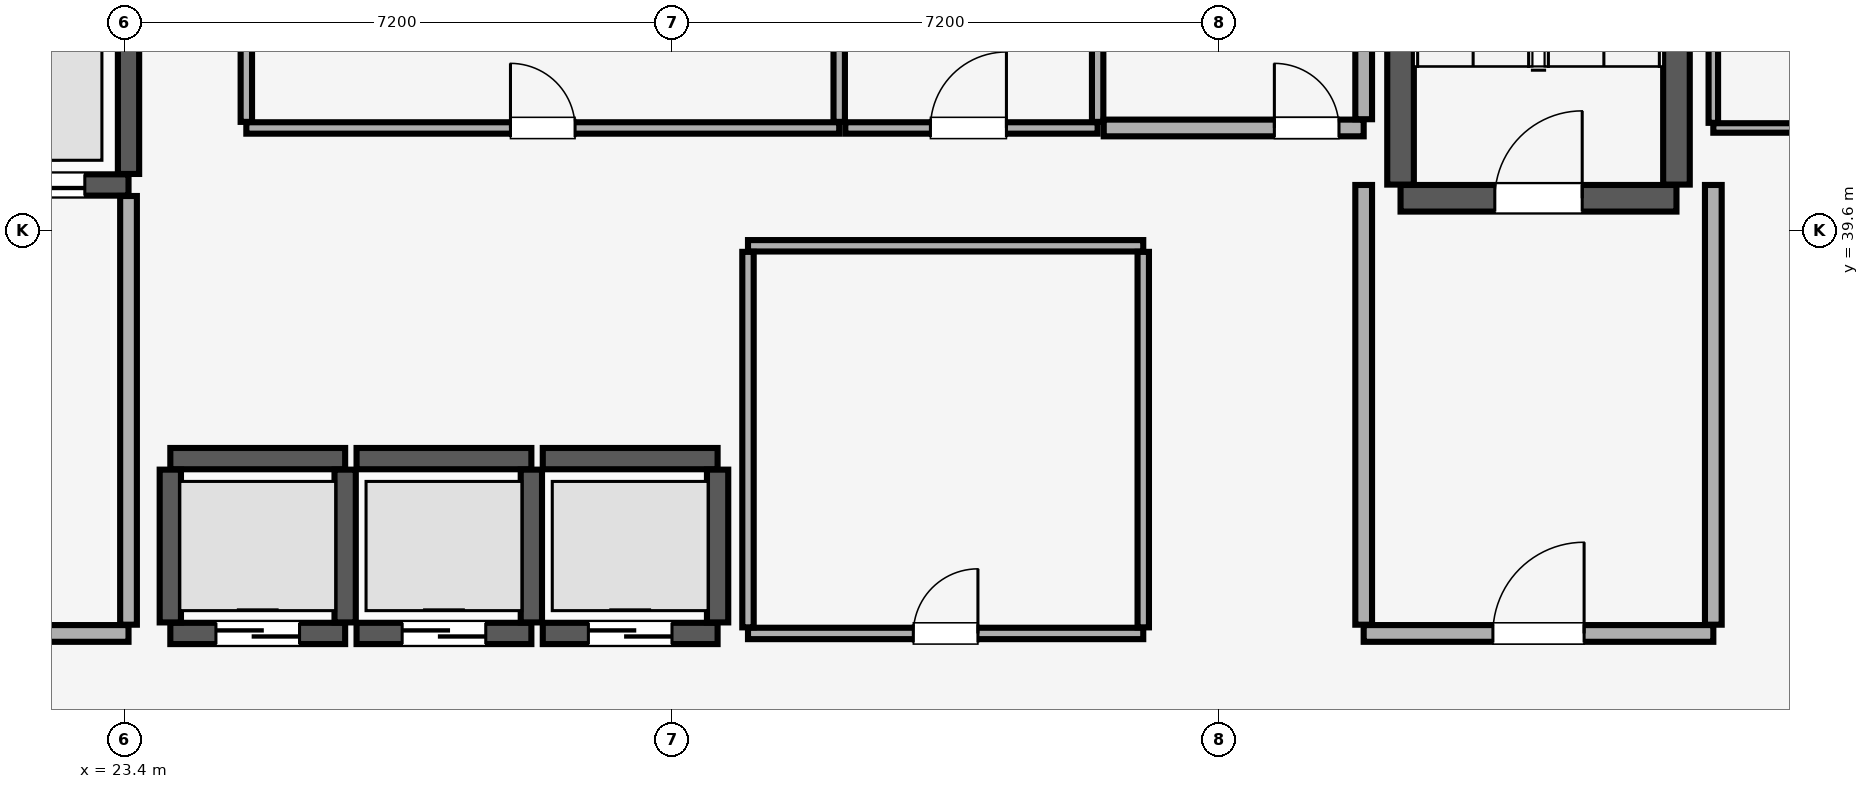
"""IFC4 building model, lengths in metres.
Left out: names, types, materials, properties, quantities, classifications, styles, units other than length and angle.
Written with IfcOpenShell. Run it as: python <this file> out.ifc"""

import sys

from ifc_helpers import new_model, si_unit, direction, frame, frame_2d, origin, place, context, subcontext, project, spatial, rectangle, extrude, element, fill, save


model = new_model("IFC4")
c1 = context("Model", 3, precision=1e-05, world=origin(), true_north=direction((0.0, 1.0)))
c2 = subcontext(c1, "Body", "Model", "MODEL_VIEW")
j1 = project(units=[si_unit("LENGTHUNIT", "METRE"), si_unit("PLANEANGLEUNIT", "RADIAN")], contexts=[c1])
p1 = place(None, origin())
s1 = spatial("IfcSite", under=j1, at=p1, CompositionType="ELEMENT")
p2 = place(p1, origin())
s2 = spatial("IfcBuilding", under=s1, at=p2, CompositionType="ELEMENT")
p3 = place(p2, frame((0.0, 0.0, 76.4)))
s3 = spatial("IfcBuildingStorey", under=s2, at=p3, CompositionType="ELEMENT", Elevation=76.4)
p4 = place(p3, frame((40.185, 40.025, 0.0), z_axis=(0.0, 0.0, 1.0), x_axis=(1.0, 0.0, 0.0)))
e1 = element("IfcWall", 1, at=p4, inside=s3, PredefinedType="SHEAR", context=c2, shape_type="SweptSolid", body=[
    extrude(rectangle(XDim=3.63, YDim=0.35, at=frame_2d((1.815, 0.0))), origin(), (0.0, 0.0, 1.0), 3.4),
])
p5 = place(p4, frame((1.24, 0.0, 0.0)))
e2 = element("IfcOpeningElement", 2, at=p5, cuts=e1, PredefinedType="OPENING", context=c2, shape_type="SweptSolid", body=[
    extrude(rectangle(XDim=1.15, YDim=2.15, at=frame_2d((0.575, 1.075))), frame((0.0, 0.185, 0.0), z_axis=(0.0, -1.0, 0.0), x_axis=(1.0, 0.0, 0.0)), (0.0, 0.0, 1.0), 0.37),
])
for number, where, z_axis, x_axis in (
    (3, (40.185, 40.205, 0.0), (0.0, 0.0, 1.0), (0.0, 1.0, 0.0)),
    (4, (43.815, 40.205, 0.0), (0.0, 0.0, 1.0), (0.0, 1.0, 0.0)),
):
    element("IfcWall", number, at=place(p3, frame(where, z_axis=z_axis, x_axis=x_axis)), inside=s3, PredefinedType="SHEAR", context=c2, shape_type="SweptSolid", body=[
        extrude(rectangle(XDim=8.09, YDim=0.35, at=frame_2d((4.045, 0.0))), origin(), (0.0, 0.0, 1.0), 3.4),
    ])
p6 = place(p3, frame((24.0, 34.3, 0.0), z_axis=(0.0, 0.0, 1.0), x_axis=(1.0, 0.0, 0.0)))
e5 = element("IfcWall", 5, at=p6, inside=s3, PredefinedType="SHEAR", context=c2, shape_type="SweptSolid", body=[
    extrude(rectangle(XDim=2.3, YDim=0.28, at=frame_2d((1.15, 0.0))), origin(), (0.0, 0.0, 1.0), 3.4),
])
p7 = place(p6, frame((0.6, 0.0, 0.0)))
e6 = element("IfcOpeningElement", 6, at=p7, cuts=e5, PredefinedType="OPENING", context=c2, shape_type="SweptSolid", body=[
    extrude(rectangle(XDim=1.1, YDim=2.2, at=frame_2d((0.55, 1.1))), frame((0.0, 0.15, 0.0), z_axis=(0.0, -1.0, 0.0), x_axis=(1.0, 0.0, 0.0)), (0.0, 0.0, 1.0), 0.3),
])
p8 = place(p3, frame((24.0, 36.6, 0.0), z_axis=(0.0, 0.0, 1.0), x_axis=(1.0, 0.0, 0.0)))
e7 = element("IfcWall", 7, at=p8, inside=s3, PredefinedType="SHEAR", context=c2, shape_type="SweptSolid", body=[
    extrude(rectangle(XDim=2.3, YDim=0.28, at=frame_2d((1.15, 0.0))), origin(), (0.0, 0.0, 1.0), 3.4),
])
for number, where, z_axis, x_axis in (
    (8, (24.0, 34.445, 0.0), (0.0, 0.0, 1.0), (0.0, 1.0, 0.0)),
    (9, (26.3, 34.445, 0.0), (0.0, 0.0, 1.0), (0.0, 1.0, 0.0)),
):
    element("IfcWall", number, at=place(p3, frame(where, z_axis=z_axis, x_axis=x_axis)), inside=s3, PredefinedType="SHEAR", context=c2, shape_type="SweptSolid", body=[
        extrude(rectangle(XDim=2.01, YDim=0.28, at=frame_2d((1.005, 0.0))), origin(), (0.0, 0.0, 1.0), 3.4),
    ])
p9 = place(p3, frame((26.45, 34.3, 0.0), z_axis=(0.0, 0.0, 1.0), x_axis=(1.0, 0.0, 0.0)))
e10 = element("IfcWall", 10, at=p9, inside=s3, PredefinedType="SHEAR", context=c2, shape_type="SweptSolid", body=[
    extrude(rectangle(XDim=2.3, YDim=0.28, at=frame_2d((1.15, 0.0))), origin(), (0.0, 0.0, 1.0), 3.4),
])
p10 = place(p9, frame((0.6, 0.0, 0.0)))
e11 = element("IfcOpeningElement", 11, at=p10, cuts=e10, PredefinedType="OPENING", context=c2, shape_type="SweptSolid", body=[
    extrude(rectangle(XDim=1.1, YDim=2.2, at=frame_2d((0.55, 1.1))), frame((0.0, 0.15, 0.0), z_axis=(0.0, -1.0, 0.0), x_axis=(1.0, 0.0, 0.0)), (0.0, 0.0, 1.0), 0.3),
])
p11 = place(p3, frame((26.45, 36.6, 0.0), z_axis=(0.0, 0.0, 1.0), x_axis=(1.0, 0.0, 0.0)))
e12 = element("IfcWall", 12, at=p11, inside=s3, PredefinedType="SHEAR", context=c2, shape_type="SweptSolid", body=[
    extrude(rectangle(XDim=2.3, YDim=0.28, at=frame_2d((1.15, 0.0))), origin(), (0.0, 0.0, 1.0), 3.4),
])
p12 = place(p3, frame((28.75, 34.445, 0.0), z_axis=(0.0, 0.0, 1.0), x_axis=(0.0, 1.0, 0.0)))
e13 = element("IfcWall", 13, at=p12, inside=s3, PredefinedType="SHEAR", context=c2, shape_type="SweptSolid", body=[
    extrude(rectangle(XDim=2.01, YDim=0.28, at=frame_2d((1.005, 0.0))), origin(), (0.0, 0.0, 1.0), 3.4),
])
p13 = place(p3, frame((28.9, 34.3, 0.0), z_axis=(0.0, 0.0, 1.0), x_axis=(1.0, 0.0, 0.0)))
e14 = element("IfcWall", 14, at=p13, inside=s3, PredefinedType="SHEAR", context=c2, shape_type="SweptSolid", body=[
    extrude(rectangle(XDim=2.3, YDim=0.28, at=frame_2d((1.15, 0.0))), origin(), (0.0, 0.0, 1.0), 3.4),
])
p14 = place(p13, frame((0.6, 0.0, 0.0)))
e15 = element("IfcOpeningElement", 15, at=p14, cuts=e14, PredefinedType="OPENING", context=c2, shape_type="SweptSolid", body=[
    extrude(rectangle(XDim=1.1, YDim=2.2, at=frame_2d((0.55, 1.1))), frame((0.0, 0.15, 0.0), z_axis=(0.0, -1.0, 0.0), x_axis=(1.0, 0.0, 0.0)), (0.0, 0.0, 1.0), 0.3),
])
p15 = place(p3, frame((28.9, 36.6, 0.0), z_axis=(0.0, 0.0, 1.0), x_axis=(1.0, 0.0, 0.0)))
e16 = element("IfcWall", 16, at=p15, inside=s3, PredefinedType="SHEAR", context=c2, shape_type="SweptSolid", body=[
    extrude(rectangle(XDim=2.3, YDim=0.28, at=frame_2d((1.15, 0.0))), origin(), (0.0, 0.0, 1.0), 3.4),
])
p16 = place(p3, frame((31.2, 34.445, 0.0), z_axis=(0.0, 0.0, 1.0), x_axis=(0.0, 1.0, 0.0)))
e17 = element("IfcWall", 17, at=p16, inside=s3, PredefinedType="SHEAR", context=c2, shape_type="SweptSolid", body=[
    extrude(rectangle(XDim=2.01, YDim=0.28, at=frame_2d((1.005, 0.0))), origin(), (0.0, 0.0, 1.0), 3.4),
])
p17 = place(p3, frame((21.035, 40.2, 0.0), z_axis=(0.0, 0.0, 1.0), x_axis=(1.0, 0.0, 0.0)))
e18 = element("IfcWall", 18, at=p17, inside=s3, PredefinedType="SHEAR", context=c2, shape_type="SweptSolid", body=[
    extrude(rectangle(XDim=2.415, YDim=0.28, at=frame_2d((1.208, 0.0))), origin(), (0.0, 0.0, 1.0), 3.4),
])
p18 = place(p17, frame((0.54, 0.0, 0.0)))
e19 = element("IfcOpeningElement", 19, at=p18, cuts=e18, PredefinedType="OPENING", context=c2, shape_type="SweptSolid", body=[
    extrude(rectangle(XDim=1.3, YDim=2.3, at=frame_2d((0.65, 1.15))), frame((0.0, 0.15, 0.0), z_axis=(0.0, -1.0, 0.0), x_axis=(1.0, 0.0, 0.0)), (0.0, 0.0, 1.0), 0.3),
])
p19 = place(p3, frame((23.45, 40.345, 0.0), z_axis=(0.0, 0.0, 1.0), x_axis=(0.0, 1.0, 0.0)))
e20 = element("IfcWall", 20, at=p19, inside=s3, PredefinedType="SHEAR", context=c2, shape_type="SweptSolid", body=[
    extrude(rectangle(XDim=2.81, YDim=0.28, at=frame_2d((1.405, 0.0))), origin(), (0.0, 0.0, 1.0), 3.4),
])
p20 = place(p3, frame((17.4, 34.3, 0.0), z_axis=(0.0, 0.0, 1.0), x_axis=(1.0, 0.0, 0.0)))
e21 = element("IfcWall", 21, at=p20, inside=s3, PredefinedType="PARTITIONING", context=c2, shape_type="SweptSolid", body=[
    extrude(rectangle(XDim=6.05, YDim=0.22, at=frame_2d((3.025, 0.0))), origin(), (0.0, 0.0, 1.0), 3.4),
])
p21 = place(p20, frame((2.2, 0.0, 0.0)))
e22 = element("IfcOpeningElement", 22, at=p21, cuts=e21, PredefinedType="OPENING", context=c2, shape_type="SweptSolid", body=[
    extrude(rectangle(XDim=1.2, YDim=2.15, at=frame_2d((0.6, 1.075))), frame((0.0, 0.12, 0.0), z_axis=(0.0, -1.0, 0.0), x_axis=(1.0, 0.0, 0.0)), (0.0, 0.0, 1.0), 0.24),
])
p22 = place(p3, frame((23.45, 34.415, 0.0), z_axis=(0.0, 0.0, 1.0), x_axis=(0.0, 1.0, 0.0)))
e23 = element("IfcWall", 23, at=p22, inside=s3, PredefinedType="PARTITIONING", context=c2, shape_type="SweptSolid", body=[
    extrude(rectangle(XDim=5.64, YDim=0.22, at=frame_2d((2.82, 0.0))), origin(), (0.0, 0.0, 1.0), 3.4),
])
p23 = place(p3, frame((39.7, 34.3, 0.0), z_axis=(0.0, 0.0, 1.0), x_axis=(1.0, 0.0, 0.0)))
e24 = element("IfcWall", 24, at=p23, inside=s3, PredefinedType="PARTITIONING", context=c2, shape_type="SweptSolid", body=[
    extrude(rectangle(XDim=4.6, YDim=0.22, at=frame_2d((2.3, 0.0))), origin(), (0.0, 0.0, 1.0), 3.4),
])
p24 = place(p23, frame((1.7, 0.0, 0.0)))
e25 = element("IfcOpeningElement", 25, at=p24, cuts=e24, PredefinedType="OPENING", context=c2, shape_type="SweptSolid", body=[
    extrude(rectangle(XDim=1.2, YDim=2.15, at=frame_2d((0.6, 1.075))), frame((0.0, 0.12, 0.0), z_axis=(0.0, -1.0, 0.0), x_axis=(1.0, 0.0, 0.0)), (0.0, 0.0, 1.0), 0.24),
])
for number, where, z_axis, x_axis in (
    (26, (39.7, 34.415, 0.0), (0.0, 0.0, 1.0), (0.0, 1.0, 0.0)),
    (27, (44.3, 34.415, 0.0), (0.0, 0.0, 1.0), (0.0, 1.0, 0.0)),
):
    element("IfcWall", number, at=place(p3, frame(where, z_axis=z_axis, x_axis=x_axis)), inside=s3, PredefinedType="PARTITIONING", context=c2, shape_type="SweptSolid", body=[
        extrude(rectangle(XDim=5.785, YDim=0.22, at=frame_2d((2.893, 0.0))), origin(), (0.0, 0.0, 1.0), 3.4),
    ])
p25 = place(p3, frame((31.6, 34.3, 0.0), z_axis=(0.0, 0.0, 1.0), x_axis=(1.0, 0.0, 0.0)))
e28 = element("IfcWall", 28, at=p25, inside=s3, PredefinedType="PARTITIONING", context=c2, shape_type="SweptSolid", body=[
    extrude(rectangle(XDim=5.2, YDim=0.15, at=frame_2d((2.6, 0.0))), origin(), (0.0, 0.0, 1.0), 3.4),
])
p26 = place(p25, frame((2.175, 0.0, 0.0)))
e29 = element("IfcOpeningElement", 29, at=p26, cuts=e28, PredefinedType="OPENING", context=c2, shape_type="SweptSolid", body=[
    extrude(rectangle(XDim=0.85, YDim=2.1, at=frame_2d((0.425, 1.05))), frame((0.0, 0.085, 0.0), z_axis=(0.0, -1.0, 0.0), x_axis=(1.0, 0.0, 0.0)), (0.0, 0.0, 1.0), 0.17),
])
p27 = place(p3, frame((31.6, 39.4, 0.0), z_axis=(0.0, 0.0, 1.0), x_axis=(1.0, 0.0, 0.0)))
e30 = element("IfcWall", 30, at=p27, inside=s3, PredefinedType="PARTITIONING", context=c2, shape_type="SweptSolid", body=[
    extrude(rectangle(XDim=5.2, YDim=0.15, at=frame_2d((2.6, 0.0))), origin(), (0.0, 0.0, 1.0), 3.4),
])
for number, where, z_axis, x_axis in (
    (31, (31.6, 34.38, 0.0), (0.0, 0.0, 1.0), (0.0, 1.0, 0.0)),
    (32, (36.8, 34.38, 0.0), (0.0, 0.0, 1.0), (0.0, 1.0, 0.0)),
):
    element("IfcWall", number, at=place(p3, frame(where, z_axis=z_axis, x_axis=x_axis)), inside=s3, PredefinedType="PARTITIONING", context=c2, shape_type="SweptSolid", body=[
        extrude(rectangle(XDim=4.94, YDim=0.15, at=frame_2d((2.47, 0.0))), origin(), (0.0, 0.0, 1.0), 3.4),
    ])
p28 = place(p3, frame((25.0, 40.95, 0.0), z_axis=(0.0, 0.0, 1.0), x_axis=(1.0, 0.0, 0.0)))
e33 = element("IfcWall", 33, at=p28, inside=s3, PredefinedType="PARTITIONING", context=c2, shape_type="SweptSolid", body=[
    extrude(rectangle(XDim=7.8, YDim=0.15, at=frame_2d((3.9, 0.0))), origin(), (0.0, 0.0, 1.0), 3.4),
])
p29 = place(p28, frame((3.475, 0.0, 0.0)))
e34 = element("IfcOpeningElement", 34, at=p29, cuts=e33, PredefinedType="OPENING", context=c2, shape_type="SweptSolid", body=[
    extrude(rectangle(XDim=0.85, YDim=2.1, at=frame_2d((0.425, 1.05))), frame((0.0, 0.085, 0.0), z_axis=(0.0, -1.0, 0.0), x_axis=(1.0, 0.0, 0.0)), (0.0, 0.0, 1.0), 0.17),
])
for number, where, z_axis, x_axis in (
    (35, (25.0, 41.03, 0.0), (0.0, 0.0, 1.0), (0.0, 1.0, 0.0)),
    (36, (32.8, 41.03, 0.0), (0.0, 0.0, 1.0), (0.0, 1.0, 0.0)),
):
    element("IfcWall", number, at=place(p3, frame(where, z_axis=z_axis, x_axis=x_axis)), inside=s3, PredefinedType="PARTITIONING", context=c2, shape_type="SweptSolid", body=[
        extrude(rectangle(XDim=7.82, YDim=0.15, at=frame_2d((3.91, 0.0))), origin(), (0.0, 0.0, 1.0), 3.4),
    ])
p30 = place(p3, frame((32.88, 40.95, 0.0), z_axis=(0.0, 0.0, 1.0), x_axis=(1.0, 0.0, 0.0)))
e37 = element("IfcWall", 37, at=p30, inside=s3, PredefinedType="PARTITIONING", context=c2, shape_type="SweptSolid", body=[
    extrude(rectangle(XDim=3.32, YDim=0.15, at=frame_2d((1.66, 0.0))), origin(), (0.0, 0.0, 1.0), 3.4),
])
p31 = place(p30, frame((1.12, 0.0, 0.0)))
e38 = element("IfcOpeningElement", 38, at=p31, cuts=e37, PredefinedType="OPENING", context=c2, shape_type="SweptSolid", body=[
    extrude(rectangle(XDim=1.0, YDim=2.15, at=frame_2d((0.5, 1.075))), frame((0.0, 0.085, 0.0), z_axis=(0.0, -1.0, 0.0), x_axis=(1.0, 0.0, 0.0)), (0.0, 0.0, 1.0), 0.17),
])
p32 = place(p3, frame((36.2, 41.03, 0.0), z_axis=(0.0, 0.0, 1.0), x_axis=(0.0, 1.0, 0.0)))
e39 = element("IfcWall", 39, at=p32, inside=s3, PredefinedType="PARTITIONING", context=c2, shape_type="SweptSolid", body=[
    extrude(rectangle(XDim=7.82, YDim=0.15, at=frame_2d((3.91, 0.0))), origin(), (0.0, 0.0, 1.0), 3.4),
])
p33 = place(p3, frame((36.28, 40.95, 0.0), z_axis=(0.0, 0.0, 1.0), x_axis=(1.0, 0.0, 0.0)))
e40 = element("IfcWall", 40, at=p33, inside=s3, PredefinedType="PARTITIONING", context=c2, shape_type="SweptSolid", body=[
    extrude(rectangle(XDim=3.42, YDim=0.22, at=frame_2d((1.71, 0.0))), origin(), (0.0, 0.0, 1.0), 3.4),
])
p34 = place(p33, frame((2.245, 0.0, 0.0)))
e41 = element("IfcOpeningElement", 41, at=p34, cuts=e40, PredefinedType="OPENING", context=c2, shape_type="SweptSolid", body=[
    extrude(rectangle(XDim=0.85, YDim=2.1, at=frame_2d((0.425, 1.05))), frame((0.0, 0.12, 0.0), z_axis=(0.0, -1.0, 0.0), x_axis=(1.0, 0.0, 0.0)), (0.0, 0.0, 1.0), 0.24),
])
p35 = place(p3, frame((39.7, 41.065, 0.0), z_axis=(0.0, 0.0, 1.0), x_axis=(0.0, 1.0, 0.0)))
e42 = element("IfcWall", 42, at=p35, inside=s3, PredefinedType="PARTITIONING", context=c2, shape_type="SweptSolid", body=[
    extrude(rectangle(XDim=7.785, YDim=0.22, at=frame_2d((3.893, 0.0))), origin(), (0.0, 0.0, 1.0), 3.4),
])
p36 = place(p3, frame((44.3, 40.95, 0.0), z_axis=(0.0, 0.0, 1.0), x_axis=(1.0, 0.0, 0.0)))
e43 = element("IfcWall", 43, at=p36, inside=s3, PredefinedType="PARTITIONING", context=c2, shape_type="SweptSolid", body=[
    extrude(rectangle(XDim=4.6, YDim=0.125, at=frame_2d((2.3, 0.0))), origin(), (0.0, 0.0, 1.0), 3.4),
])
p37 = place(p36, frame((2.85, 0.0, 0.0)))
e44 = element("IfcOpeningElement", 44, at=p37, cuts=e43, PredefinedType="OPENING", context=c2, shape_type="SweptSolid", body=[
    extrude(rectangle(XDim=0.9, YDim=2.1, at=frame_2d((0.45, 1.05))), frame((0.0, 0.073, 0.0), z_axis=(0.0, -1.0, 0.0), x_axis=(1.0, 0.0, 0.0)), (0.0, 0.0, 1.0), 0.145),
])
p38 = place(p3, frame((44.3, 41.018, 0.0), z_axis=(0.0, 0.0, 1.0), x_axis=(0.0, 1.0, 0.0)))
e45 = element("IfcWall", 45, at=p38, inside=s3, PredefinedType="PARTITIONING", context=c2, shape_type="SweptSolid", body=[
    extrude(rectangle(XDim=3.515, YDim=0.125, at=frame_2d((1.757, 0.0))), origin(), (0.0, 0.0, 1.0), 3.4),
])
p39 = place(p5, origin())
e46 = element("IfcDoor", 46, at=p39, inside=s3, OperationType="SINGLE_SWING_RIGHT", PredefinedType="DOOR", context=c2, shape_type="SweptSolid", body=[
    extrude(rectangle(XDim=1.15, YDim=2.15, at=frame_2d((0.575, 1.075))), frame((0.0, 0.025, 0.0), z_axis=(0.0, -1.0, 0.0), x_axis=(1.0, 0.0, 0.0)), (0.0, 0.0, 1.0), 0.05),
])
fill(e2, e46)
p40 = place(p7, origin())
e47 = element("IfcDoor", 47, at=p40, inside=s3, OperationType="DOUBLE_DOOR_SLIDING", PredefinedType="DOOR", context=c2, shape_type="SweptSolid", body=[
    extrude(rectangle(XDim=1.1, YDim=2.2, at=frame_2d((0.55, 1.1))), frame((0.0, 0.025, 0.0), z_axis=(0.0, -1.0, 0.0), x_axis=(1.0, 0.0, 0.0)), (0.0, 0.0, 1.0), 0.05),
])
fill(e6, e47)
p41 = place(p10, origin())
e48 = element("IfcDoor", 48, at=p41, inside=s3, OperationType="DOUBLE_DOOR_SLIDING", PredefinedType="DOOR", context=c2, shape_type="SweptSolid", body=[
    extrude(rectangle(XDim=1.1, YDim=2.2, at=frame_2d((0.55, 1.1))), frame((0.0, 0.025, 0.0), z_axis=(0.0, -1.0, 0.0), x_axis=(1.0, 0.0, 0.0)), (0.0, 0.0, 1.0), 0.05),
])
fill(e11, e48)
p42 = place(p14, origin())
e49 = element("IfcDoor", 49, at=p42, inside=s3, OperationType="DOUBLE_DOOR_SLIDING", PredefinedType="DOOR", context=c2, shape_type="SweptSolid", body=[
    extrude(rectangle(XDim=1.1, YDim=2.2, at=frame_2d((0.55, 1.1))), frame((0.0, 0.025, 0.0), z_axis=(0.0, -1.0, 0.0), x_axis=(1.0, 0.0, 0.0)), (0.0, 0.0, 1.0), 0.05),
])
fill(e15, e49)
p43 = place(p18, origin())
e50 = element("IfcDoor", 50, at=p43, inside=s3, OperationType="DOUBLE_DOOR_SLIDING", PredefinedType="DOOR", context=c2, shape_type="SweptSolid", body=[
    extrude(rectangle(XDim=1.3, YDim=2.3, at=frame_2d((0.65, 1.15))), frame((0.0, 0.025, 0.0), z_axis=(0.0, -1.0, 0.0), x_axis=(1.0, 0.0, 0.0)), (0.0, 0.0, 1.0), 0.05),
])
fill(e19, e50)
p44 = place(p24, origin())
e51 = element("IfcDoor", 51, at=p44, inside=s3, OperationType="SINGLE_SWING_RIGHT", PredefinedType="DOOR", context=c2, shape_type="SweptSolid", body=[
    extrude(rectangle(XDim=1.2, YDim=2.15, at=frame_2d((0.6, 1.075))), frame((0.0, 0.025, 0.0), z_axis=(0.0, -1.0, 0.0), x_axis=(1.0, 0.0, 0.0)), (0.0, 0.0, 1.0), 0.05),
])
fill(e25, e51)
p45 = place(p26, origin())
e52 = element("IfcDoor", 52, at=p45, inside=s3, OperationType="SINGLE_SWING_RIGHT", PredefinedType="DOOR", context=c2, shape_type="SweptSolid", body=[
    extrude(rectangle(XDim=0.85, YDim=2.1, at=frame_2d((0.425, 1.05))), frame((0.0, 0.025, 0.0), z_axis=(0.0, -1.0, 0.0), x_axis=(1.0, 0.0, 0.0)), (0.0, 0.0, 1.0), 0.05),
])
fill(e29, e52)
p46 = place(p29, origin())
e53 = element("IfcDoor", 53, at=p46, inside=s3, OperationType="SINGLE_SWING_LEFT", PredefinedType="DOOR", context=c2, shape_type="SweptSolid", body=[
    extrude(rectangle(XDim=0.85, YDim=2.1, at=frame_2d((0.425, 1.05))), frame((0.0, 0.025, 0.0), z_axis=(0.0, -1.0, 0.0), x_axis=(1.0, 0.0, 0.0)), (0.0, 0.0, 1.0), 0.05),
])
fill(e34, e53)
p47 = place(p31, origin())
e54 = element("IfcDoor", 54, at=p47, inside=s3, OperationType="SINGLE_SWING_RIGHT", PredefinedType="DOOR", context=c2, shape_type="SweptSolid", body=[
    extrude(rectangle(XDim=1.0, YDim=2.15, at=frame_2d((0.5, 1.075))), frame((0.0, 0.025, 0.0), z_axis=(0.0, -1.0, 0.0), x_axis=(1.0, 0.0, 0.0)), (0.0, 0.0, 1.0), 0.05),
])
fill(e38, e54)
p48 = place(p34, origin())
e55 = element("IfcDoor", 55, at=p48, inside=s3, OperationType="SINGLE_SWING_LEFT", PredefinedType="DOOR", context=c2, shape_type="SweptSolid", body=[
    extrude(rectangle(XDim=0.85, YDim=2.1, at=frame_2d((0.425, 1.05))), frame((0.0, 0.025, 0.0), z_axis=(0.0, -1.0, 0.0), x_axis=(1.0, 0.0, 0.0)), (0.0, 0.0, 1.0), 0.05),
])
fill(e41, e55)
save(model, sys.argv[1])
